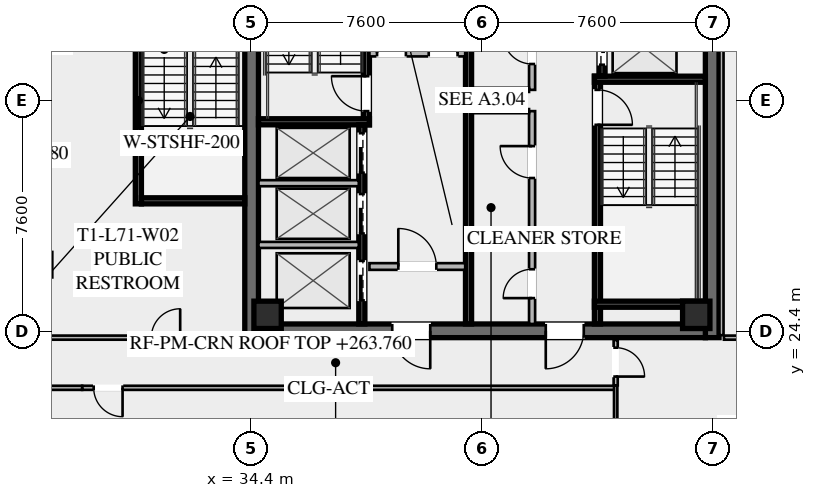
"""IFC4 building model, lengths in metres.
Left out: names, types, materials, properties, quantities, classifications, styles, units other than length and angle.
Written with IfcOpenShell. Run it as: python <this file> out.ifc"""

import sys

from ifc_helpers import new_model, si_unit, direction, frame, frame_2d, origin, origin_2d, place, context, subcontext, project, spatial, rectangle, hollow_rectangle, extrude, element, fill, save


model = new_model("IFC4")
c1 = context("Model", 3, precision=1e-05, world=origin(), true_north=direction((0.0, 1.0)))
c2 = subcontext(c1, "Body", "Model", "MODEL_VIEW")
j1 = project(units=[si_unit("LENGTHUNIT", "METRE"), si_unit("PLANEANGLEUNIT", "RADIAN")], contexts=[c1])
p1 = place(None, origin())
s1 = spatial("IfcSite", under=j1, at=p1, CompositionType="ELEMENT")
p2 = place(p1, origin())
s2 = spatial("IfcBuilding", under=s1, at=p2, CompositionType="ELEMENT")
p3 = place(p2, frame((0.0, 0.0, 263.4)))
s3 = spatial("IfcBuildingStorey", under=s2, at=p3, CompositionType="ELEMENT", Elevation=263.4)
for number, where, z_axis, x_axis in (
    (1, (34.425, 24.2, 0.0), (0.0, 0.0, 1.0), (0.0, 1.0, 0.0)),
    (2, (49.575, 39.8, 0.0), (0.0, 0.0, 1.0), (0.0, -1.0, 0.0)),
):
    element("IfcWall", number, at=place(p3, frame(where, z_axis=z_axis, x_axis=x_axis)), inside=s3, PredefinedType="SHEAR", context=c2, shape_type="SweptSolid", body=[
        extrude(rectangle(XDim=15.6, YDim=0.45, at=frame_2d((7.8, 0.0))), origin(), (0.0, 0.0, 1.0), 3.55),
    ])
p4 = place(p3, frame((49.35, 24.425, 0.0), z_axis=(0.0, 0.0, 1.0), x_axis=(-1.0, 0.0, 0.0)))
e3 = element("IfcWall", 3, at=p4, inside=s3, PredefinedType="SHEAR", context=c2, shape_type="SweptSolid", body=[
    extrude(rectangle(XDim=14.7, YDim=0.45, at=frame_2d((7.35, 0.0))), origin(), (0.0, 0.0, 1.0), 3.55),
])
p5 = place(p4, frame((9.05, 0.0, 0.0)))
e4 = element("IfcOpeningElement", 4, at=p5, cuts=e3, PredefinedType="OPENING", context=c2, shape_type="SweptSolid", body=[
    extrude(rectangle(XDim=1.25, YDim=2.25, at=frame_2d((0.625, 1.125))), frame((0.0, 0.235, 0.0), z_axis=(0.0, -1.0, 0.0), x_axis=(1.0, 0.0, 0.0)), (0.0, 0.0, 1.0), 0.47),
])
p6 = place(p4, frame((4.0, 0.0, 0.0)))
e5 = element("IfcOpeningElement", 5, at=p6, cuts=e3, PredefinedType="OPENING", context=c2, shape_type="SweptSolid", body=[
    extrude(rectangle(XDim=1.25, YDim=2.25, at=frame_2d((0.625, 1.125))), frame((0.0, 0.235, 0.0), z_axis=(0.0, -1.0, 0.0), x_axis=(1.0, 0.0, 0.0)), (0.0, 0.0, 1.0), 0.47),
])
for number, where, z_axis, x_axis in (
    (6, (34.95, 24.95, 0.0), (0.0, 0.0, 1.0), (1.0, 0.0, 0.0)),
    (7, (49.05, 24.95, 0.0), (0.0, 0.0, 1.0), (1.0, 0.0, 0.0)),
):
    element("IfcColumn", number, at=place(p3, frame(where, z_axis=z_axis, x_axis=x_axis)), inside=s3, PredefinedType="COLUMN", context=c2, shape_type="SweptSolid", body=[
        extrude(hollow_rectangle(XDim=0.9, YDim=0.9, WallThickness=0.04, at=origin_2d()), origin(), (0.0, 0.0, 1.0), 3.37),
    ])
p7 = place(p3, frame((38.2, 31.2, 0.0), z_axis=(0.0, 0.0, 1.0), x_axis=(0.0, 1.0, 0.0)))
e8 = element("IfcWall", 8, at=p7, inside=s3, PredefinedType="SHEAR", context=c2, shape_type="SweptSolid", body=[
    extrude(rectangle(XDim=8.15, YDim=0.2, at=frame_2d((4.075, 0.0))), origin(), (0.0, 0.0, 1.0), 3.37),
])
p8 = place(p7, frame((0.45, 0.0, 0.0)))
e9 = element("IfcOpeningElement", 9, at=p8, cuts=e8, PredefinedType="OPENING", context=c2, shape_type="SweptSolid", body=[
    extrude(rectangle(XDim=1.15, YDim=2.2, at=frame_2d((0.575, 1.1))), frame((0.0, 0.11, 0.0), z_axis=(0.0, -1.0, 0.0), x_axis=(1.0, 0.0, 0.0)), (0.0, 0.0, 1.0), 0.22),
])
p9 = place(p3, frame((34.65, 31.3, 0.0), z_axis=(0.0, 0.0, 1.0), x_axis=(1.0, 0.0, 0.0)))
e10 = element("IfcWall", 10, at=p9, inside=s3, PredefinedType="SHEAR", context=c2, shape_type="SweptSolid", body=[
    extrude(rectangle(XDim=3.65, YDim=0.2, at=frame_2d((1.825, 0.0))), origin(), (0.0, 0.0, 1.0), 3.37),
])
p10 = place(p3, frame((45.8, 32.8, 0.0), z_axis=(0.0, 0.0, 1.0), x_axis=(0.0, -1.0, 0.0)))
e11 = element("IfcWall", 11, at=p10, inside=s3, PredefinedType="SHEAR", context=c2, shape_type="SweptSolid", body=[
    extrude(rectangle(XDim=8.15, YDim=0.2, at=frame_2d((4.075, 0.0))), origin(), (0.0, 0.0, 1.0), 3.37),
])
p11 = place(p10, frame((0.45, 0.0, 0.0)))
e12 = element("IfcOpeningElement", 12, at=p11, cuts=e11, PredefinedType="OPENING", context=c2, shape_type="SweptSolid", body=[
    extrude(rectangle(XDim=1.15, YDim=2.2, at=frame_2d((0.575, 1.1))), frame((0.0, 0.11, 0.0), z_axis=(0.0, -1.0, 0.0), x_axis=(1.0, 0.0, 0.0)), (0.0, 0.0, 1.0), 0.22),
])
for number, where, z_axis, x_axis in (
    (13, (45.7, 32.7, 0.0), (0.0, 0.0, 1.0), (1.0, 0.0, 0.0)),
    (14, (45.7, 25.3, 0.0), (0.0, 0.0, 1.0), (1.0, 0.0, 0.0)),
):
    element("IfcWall", number, at=place(p3, frame(where, z_axis=z_axis, x_axis=x_axis)), inside=s3, PredefinedType="SHEAR", context=c2, shape_type="SweptSolid", body=[
        extrude(rectangle(XDim=3.65, YDim=0.2, at=frame_2d((1.825, 0.0))), origin(), (0.0, 0.0, 1.0), 3.37),
    ])
p12 = place(p3, frame((41.56, 24.65, 0.0), z_axis=(0.0, 0.0, 1.0), x_axis=(0.0, 1.0, 0.0)))
e15 = element("IfcWall", 15, at=p12, inside=s3, PredefinedType="SHEAR", context=c2, shape_type="SweptSolid", body=[
    extrude(rectangle(XDim=14.7, YDim=0.2, at=frame_2d((7.35, 0.0))), origin(), (0.0, 0.0, 1.0), 3.37),
])
p13 = place(p3, frame((38.3, 33.56, 0.0), z_axis=(0.0, 0.0, 1.0), x_axis=(1.0, 0.0, 0.0)))
e16 = element("IfcWall", 16, at=p13, inside=s3, PredefinedType="SOLIDWALL", context=c2, shape_type="SweptSolid", body=[
    extrude(rectangle(XDim=3.15, YDim=0.22, at=frame_2d((1.575, 0.0))), origin(), (0.0, 0.0, 1.0), 2.723),
])
p14 = place(p13, frame((0.25, 0.0, 0.0)))
e17 = element("IfcOpeningElement", 17, at=p14, cuts=e16, PredefinedType="OPENING", context=c2, shape_type="SweptSolid", body=[
    extrude(rectangle(XDim=0.95, YDim=2.05, at=frame_2d((0.475, 1.025))), frame((0.0, 0.12, 0.0), z_axis=(0.0, -1.0, 0.0), x_axis=(1.0, 0.0, 0.0)), (0.0, 0.0, 1.0), 0.24),
])
p15 = place(p13, frame((1.95, 0.0, 0.0)))
e18 = element("IfcOpeningElement", 18, at=p15, cuts=e16, PredefinedType="OPENING", context=c2, shape_type="SweptSolid", body=[
    extrude(rectangle(XDim=0.95, YDim=2.05, at=frame_2d((0.475, 1.025))), frame((0.0, 0.12, 0.0), z_axis=(0.0, -1.0, 0.0), x_axis=(1.0, 0.0, 0.0)), (0.0, 0.0, 1.0), 0.24),
])
p16 = place(p3, frame((38.3, 26.54, 0.0), z_axis=(0.0, 0.0, 1.0), x_axis=(1.0, 0.0, 0.0)))
e19 = element("IfcWall", 19, at=p16, inside=s3, PredefinedType="SOLIDWALL", context=c2, shape_type="SweptSolid", body=[
    extrude(rectangle(XDim=3.15, YDim=0.22, at=frame_2d((1.575, 0.0))), origin(), (0.0, 0.0, 1.0), 2.723),
])
p17 = place(p16, frame((0.95, 0.0, 0.0)))
e20 = element("IfcOpeningElement", 20, at=p17, cuts=e19, PredefinedType="OPENING", context=c2, shape_type="SweptSolid", body=[
    extrude(rectangle(XDim=1.25, YDim=2.25, at=frame_2d((0.625, 1.125))), frame((0.0, 0.12, 0.0), z_axis=(0.0, -1.0, 0.0), x_axis=(1.0, 0.0, 0.0)), (0.0, 0.0, 1.0), 0.24),
])
p18 = place(p3, frame((38.05, 24.65, 0.0), z_axis=(0.0, 0.0, 1.0), x_axis=(0.0, 1.0, 0.0)))
e21 = element("IfcWall", 21, at=p18, inside=s3, PredefinedType="SHEAR", context=c2, shape_type="SweptSolid", body=[
    extrude(rectangle(XDim=6.55, YDim=0.2, at=frame_2d((3.275, 0.0))), origin(), (0.0, 0.0, 1.0), 3.37),
])
p19 = place(p18, frame((4.975, 0.0, 0.0)))
e22 = element("IfcOpeningElement", 22, at=p19, cuts=e21, PredefinedType="OPENING", context=c2, shape_type="SweptSolid", body=[
    extrude(rectangle(XDim=1.3, YDim=2.25, at=frame_2d((0.65, 1.125))), frame((0.0, 0.11, 0.0), z_axis=(0.0, -1.0, 0.0), x_axis=(1.0, 0.0, 0.0)), (0.0, 0.0, 1.0), 0.22),
])
p20 = place(p18, frame((2.975, 0.0, 0.0)))
e23 = element("IfcOpeningElement", 23, at=p20, cuts=e21, PredefinedType="OPENING", context=c2, shape_type="SweptSolid", body=[
    extrude(rectangle(XDim=1.3, YDim=2.25, at=frame_2d((0.65, 1.125))), frame((0.0, 0.11, 0.0), z_axis=(0.0, -1.0, 0.0), x_axis=(1.0, 0.0, 0.0)), (0.0, 0.0, 1.0), 0.22),
])
p21 = place(p18, frame((0.775, 0.0, 0.0)))
e24 = element("IfcOpeningElement", 24, at=p21, cuts=e21, PredefinedType="OPENING", context=c2, shape_type="SweptSolid", body=[
    extrude(rectangle(XDim=1.3, YDim=2.25, at=frame_2d((0.65, 1.125))), frame((0.0, 0.11, 0.0), z_axis=(0.0, -1.0, 0.0), x_axis=(1.0, 0.0, 0.0)), (0.0, 0.0, 1.0), 0.22),
])
for number, where, z_axis, x_axis in (
    (25, (34.65, 27.25, 0.0), (0.0, 0.0, 1.0), (1.0, 0.0, 0.0)),
    (26, (34.65, 29.28, 0.0), (0.0, 0.0, 1.0), (1.0, 0.0, 0.0)),
):
    element("IfcWall", number, at=place(p3, frame(where, z_axis=z_axis, x_axis=x_axis)), inside=s3, PredefinedType="SOLIDWALL", context=c2, shape_type="SweptSolid", body=[
        extrude(rectangle(XDim=3.3, YDim=0.2, at=frame_2d((1.65, 0.0))), origin(), (0.0, 0.0, 1.0), 3.37),
    ])
p22 = place(p3, frame((45.95, 39.35, 0.0), z_axis=(0.0, 0.0, 1.0), x_axis=(0.0, -1.0, 0.0)))
e27 = element("IfcWall", 27, at=p22, inside=s3, PredefinedType="SHEAR", context=c2, shape_type="SweptSolid", body=[
    extrude(rectangle(XDim=6.55, YDim=0.2, at=frame_2d((3.275, 0.0))), origin(), (0.0, 0.0, 1.0), 3.37),
])
p23 = place(p22, frame((5.075, 0.0, 0.0)))
e28 = element("IfcOpeningElement", 28, at=p23, cuts=e27, PredefinedType="OPENING", context=c2, shape_type="SweptSolid", body=[
    extrude(rectangle(XDim=1.1, YDim=2.2, at=frame_2d((0.55, 1.1))), frame((0.0, 0.11, 0.0), z_axis=(0.0, -1.0, 0.0), x_axis=(1.0, 0.0, 0.0)), (0.0, 0.0, 1.0), 0.22),
])
p24 = place(p22, frame((3.025, 0.0, 0.0)))
e29 = element("IfcOpeningElement", 29, at=p24, cuts=e27, PredefinedType="OPENING", context=c2, shape_type="SweptSolid", body=[
    extrude(rectangle(XDim=1.1, YDim=2.2, at=frame_2d((0.55, 1.1))), frame((0.0, 0.11, 0.0), z_axis=(0.0, -1.0, 0.0), x_axis=(1.0, 0.0, 0.0)), (0.0, 0.0, 1.0), 0.22),
])
p25 = place(p22, frame((1.025, 0.0, 0.0)))
e30 = element("IfcOpeningElement", 30, at=p25, cuts=e27, PredefinedType="OPENING", context=c2, shape_type="SweptSolid", body=[
    extrude(rectangle(XDim=1.1, YDim=2.2, at=frame_2d((0.55, 1.1))), frame((0.0, 0.11, 0.0), z_axis=(0.0, -1.0, 0.0), x_axis=(1.0, 0.0, 0.0)), (0.0, 0.0, 1.0), 0.22),
])
p26 = place(p3, frame((43.65, 24.65, 0.0), z_axis=(0.0, 0.0, 1.0), x_axis=(0.0, 1.0, 0.0)))
e31 = element("IfcWall", 31, at=p26, inside=s3, PredefinedType="SOLIDWALL", context=c2, shape_type="SweptSolid", body=[
    extrude(rectangle(XDim=7.0, YDim=0.2, at=frame_2d((3.5, 0.0))), origin(), (0.0, 0.0, 1.0), 2.723),
])
p27 = place(p26, frame((0.85, 0.0, 0.0)))
e32 = element("IfcOpeningElement", 32, at=p27, cuts=e31, PredefinedType="OPENING", context=c2, shape_type="SweptSolid", body=[
    extrude(rectangle(XDim=0.95, YDim=2.05, at=frame_2d((0.475, 1.025))), frame((0.0, 0.11, 0.0), z_axis=(0.0, -1.0, 0.0), x_axis=(1.0, 0.0, 0.0)), (0.0, 0.0, 1.0), 0.22),
])
p28 = place(p26, frame((4.8, 0.0, 0.0)))
e33 = element("IfcOpeningElement", 33, at=p28, cuts=e31, PredefinedType="OPENING", context=c2, shape_type="SweptSolid", body=[
    extrude(rectangle(XDim=1.05, YDim=2.2, at=frame_2d((0.525, 1.1))), frame((0.0, 0.11, 0.0), z_axis=(0.0, -1.0, 0.0), x_axis=(1.0, 0.0, 0.0)), (0.0, 0.0, 1.0), 0.22),
])
for number, where, z_axis, x_axis in (
    (34, (41.67, 31.65, 0.0), (0.0, 0.0, 1.0), (1.0, 0.0, 0.0)),
    (35, (41.67, 27.6, 0.0), (0.0, 0.0, 1.0), (1.0, 0.0, 0.0)),
):
    element("IfcWall", number, at=place(p3, frame(where, z_axis=z_axis, x_axis=x_axis)), inside=s3, PredefinedType="PARTITIONING", context=c2, shape_type="SweptSolid", body=[
        extrude(rectangle(XDim=1.88, YDim=0.135, at=frame_2d((0.94, 0.0))), origin(), (0.0, 0.0, 1.0), 2.723),
    ])
p29 = place(p3, frame((43.65, 32.35, 0.0), z_axis=(0.0, 0.0, 1.0), x_axis=(0.0, 1.0, 0.0)))
e36 = element("IfcWall", 36, at=p29, inside=s3, PredefinedType="SOLIDWALL", context=c2, shape_type="SweptSolid", body=[
    extrude(rectangle(XDim=7.0, YDim=0.2, at=frame_2d((3.5, 0.0))), origin(), (0.0, 0.0, 1.0), 2.723),
])
p30 = place(p29, frame((0.85, 0.0, 0.0)))
e37 = element("IfcOpeningElement", 37, at=p30, cuts=e36, PredefinedType="OPENING", context=c2, shape_type="SweptSolid", body=[
    extrude(rectangle(XDim=0.95, YDim=2.05, at=frame_2d((0.475, 1.025))), frame((0.0, 0.11, 0.0), z_axis=(0.0, -1.0, 0.0), x_axis=(1.0, 0.0, 0.0)), (0.0, 0.0, 1.0), 0.22),
])
p31 = place(p29, frame((4.85, 0.0, 0.0)))
e38 = element("IfcOpeningElement", 38, at=p31, cuts=e36, PredefinedType="OPENING", context=c2, shape_type="SweptSolid", body=[
    extrude(rectangle(XDim=0.95, YDim=2.05, at=frame_2d((0.475, 1.025))), frame((0.0, 0.11, 0.0), z_axis=(0.0, -1.0, 0.0), x_axis=(1.0, 0.0, 0.0)), (0.0, 0.0, 1.0), 0.22),
])
p32 = place(p3, frame((41.67, 32.35, 0.0), z_axis=(0.0, 0.0, 1.0), x_axis=(1.0, 0.0, 0.0)))
e39 = element("IfcWall", 39, at=p32, inside=s3, PredefinedType="PARTITIONING", context=c2, shape_type="SweptSolid", body=[
    extrude(rectangle(XDim=1.88, YDim=0.135, at=frame_2d((0.94, 0.0))), origin(), (0.0, 0.0, 1.0), 2.723),
])
p33 = place(p3, frame((30.7, 28.6, 0.0), z_axis=(0.0, 0.0, 1.0), x_axis=(0.0, 1.0, 0.0)))
e40 = element("IfcWall", 40, at=p33, inside=s3, PredefinedType="SHEAR", context=c2, shape_type="SweptSolid", body=[
    extrude(rectangle(XDim=6.8, YDim=0.2, at=frame_2d((3.4, 0.0))), origin(), (0.0, 0.0, 1.0), 3.37),
])
p34 = place(p3, frame((30.8, 28.7, 0.0), z_axis=(0.0, 0.0, 1.0), x_axis=(1.0, 0.0, 0.0)))
e41 = element("IfcWall", 41, at=p34, inside=s3, PredefinedType="SHEAR", context=c2, shape_type="SweptSolid", body=[
    extrude(rectangle(XDim=3.4, YDim=0.2, at=frame_2d((1.7, 0.0))), origin(), (0.0, 0.0, 1.0), 3.37),
])
p35 = place(p3, frame((46.4, 22.55, 0.0), z_axis=(0.0, 0.0, 1.0), x_axis=(-1.0, 0.0, 0.0)))
e42 = element("IfcWall", 42, at=p35, inside=s3, PredefinedType="PARTITIONING", context=c2, shape_type="SweptSolid", body=[
    extrude(rectangle(XDim=17.55, YDim=0.135, at=frame_2d((8.775, 0.0))), origin(), (0.0, 0.0, 1.0), 2.723),
])
p36 = place(p35, frame((16.22, 0.0, 0.0)))
e43 = element("IfcOpeningElement", 43, at=p36, cuts=e42, PredefinedType="OPENING", context=c2, shape_type="SweptSolid", body=[
    extrude(rectangle(XDim=0.95, YDim=2.05, at=frame_2d((0.475, 1.025))), frame((0.0, 0.077, 0.0), z_axis=(0.0, -1.0, 0.0), x_axis=(1.0, 0.0, 0.0)), (0.0, 0.0, 1.0), 0.155),
])
p37 = place(p3, frame((26.82, 22.55, 0.0), z_axis=(0.0, 0.0, 1.0), x_axis=(1.0, 0.0, 0.0)))
e44 = element("IfcWall", 44, at=p37, inside=s3, PredefinedType="PARTITIONING", context=c2, shape_type="SweptSolid", body=[
    extrude(rectangle(XDim=2.03, YDim=0.135, at=frame_2d((1.015, 0.0))), origin(), (0.0, 0.0, 1.0), 2.723),
])
p38 = place(p3, frame((46.4, 24.12, 0.0), z_axis=(0.0, 0.0, 1.0), x_axis=(0.0, -1.0, 0.0)))
e45 = element("IfcWall", 45, at=p38, inside=s3, PredefinedType="PARTITIONING", context=c2, shape_type="SweptSolid", body=[
    extrude(rectangle(XDim=1.49, YDim=0.135, at=frame_2d((0.745, 0.0))), origin(), (0.0, 0.0, 1.0), 2.723),
])
p39 = place(p38, frame((0.25, 0.0, 0.0)))
e46 = element("IfcOpeningElement", 46, at=p39, cuts=e45, PredefinedType="OPENING", context=c2, shape_type="SweptSolid", body=[
    extrude(rectangle(XDim=0.95, YDim=2.05, at=frame_2d((0.475, 1.025))), frame((0.0, 0.077, 0.0), z_axis=(0.0, -1.0, 0.0), x_axis=(1.0, 0.0, 0.0)), (0.0, 0.0, 1.0), 0.155),
])
p40 = place(p3, frame((46.4, 16.82, 0.0), z_axis=(0.0, 0.0, 1.0), x_axis=(0.0, 1.0, 0.0)))
e47 = element("IfcWall", 47, at=p40, inside=s3, PredefinedType="PARTITIONING", context=c2, shape_type="SweptSolid", body=[
    extrude(rectangle(XDim=5.81, YDim=0.11, at=frame_2d((2.905, 0.0))), origin(), (0.0, 0.0, 1.0), 2.723),
])
p41 = place(p3, frame((49.88, 39.72, 0.0), z_axis=(0.0, 0.0, 1.0), x_axis=(0.0, -1.0, 0.0)))
e48 = element("IfcWall", 48, at=p41, inside=s3, PredefinedType="PARTITIONING", context=c2, shape_type="SweptSolid", body=[
    extrude(rectangle(XDim=15.44, YDim=0.135, at=frame_2d((7.72, 0.0))), origin(), (0.0, 0.0, 1.0), 2.723),
])
p42 = place(p3, frame((49.96, 24.2, 0.0), z_axis=(0.0, 0.0, 1.0), x_axis=(1.0, 0.0, 0.0)))
e49 = element("IfcWall", 49, at=p42, inside=s3, PredefinedType="PARTITIONING", context=c2, shape_type="SweptSolid", body=[
    extrude(rectangle(XDim=7.07, YDim=0.135, at=frame_2d((3.535, 0.0))), origin(), (0.0, 0.0, 1.0), 2.723),
])
p43 = place(p3, frame((26.97, 24.2, 0.0), z_axis=(0.0, 0.0, 1.0), x_axis=(1.0, 0.0, 0.0)))
e50 = element("IfcWall", 50, at=p43, inside=s3, PredefinedType="PARTITIONING", context=c2, shape_type="SweptSolid", body=[
    extrude(rectangle(XDim=7.15, YDim=0.135, at=frame_2d((3.575, 0.0))), origin(), (0.0, 0.0, 1.0), 2.723),
])
p44 = place(p43, frame((4.155, 0.0, 0.0)))
e51 = element("IfcOpeningElement", 51, at=p44, cuts=e50, PredefinedType="OPENING", context=c2, shape_type="SweptSolid", body=[
    extrude(rectangle(XDim=0.95, YDim=2.05, at=frame_2d((0.475, 1.025))), frame((0.0, 0.077, 0.0), z_axis=(0.0, -1.0, 0.0), x_axis=(1.0, 0.0, 0.0)), (0.0, 0.0, 1.0), 0.155),
])
p45 = place(p5, origin())
e52 = element("IfcDoor", 52, at=p45, inside=s3, OperationType="SINGLE_SWING_LEFT", PredefinedType="DOOR", context=c2, shape_type="SweptSolid", body=[
    extrude(rectangle(XDim=1.25, YDim=2.25, at=frame_2d((0.625, 1.125))), frame((0.0, 0.025, 0.0), z_axis=(0.0, -1.0, 0.0), x_axis=(1.0, 0.0, 0.0)), (0.0, 0.0, 1.0), 0.05),
])
fill(e4, e52)
p46 = place(p6, origin())
e53 = element("IfcDoor", 53, at=p46, inside=s3, OperationType="SINGLE_SWING_RIGHT", PredefinedType="DOOR", context=c2, shape_type="SweptSolid", body=[
    extrude(rectangle(XDim=1.25, YDim=2.25, at=frame_2d((0.625, 1.125))), frame((0.0, 0.025, 0.0), z_axis=(0.0, -1.0, 0.0), x_axis=(1.0, 0.0, 0.0)), (0.0, 0.0, 1.0), 0.05),
])
fill(e5, e53)
p47 = place(p8, origin())
e54 = element("IfcDoor", 54, at=p47, inside=s3, OperationType="SINGLE_SWING_RIGHT", PredefinedType="DOOR", context=c2, shape_type="SweptSolid", body=[
    extrude(rectangle(XDim=1.15, YDim=2.2, at=frame_2d((0.575, 1.1))), frame((0.0, 0.025, 0.0), z_axis=(0.0, -1.0, 0.0), x_axis=(1.0, 0.0, 0.0)), (0.0, 0.0, 1.0), 0.05),
])
fill(e9, e54)
p48 = place(p11, origin())
e55 = element("IfcDoor", 55, at=p48, inside=s3, OperationType="SINGLE_SWING_RIGHT", PredefinedType="DOOR", context=c2, shape_type="SweptSolid", body=[
    extrude(rectangle(XDim=1.15, YDim=2.2, at=frame_2d((0.575, 1.1))), frame((0.0, 0.025, 0.0), z_axis=(0.0, -1.0, 0.0), x_axis=(1.0, 0.0, 0.0)), (0.0, 0.0, 1.0), 0.05),
])
fill(e12, e55)
p49 = place(p17, origin())
e56 = element("IfcDoor", 56, at=p49, inside=s3, OperationType="SINGLE_SWING_LEFT", PredefinedType="DOOR", context=c2, shape_type="SweptSolid", body=[
    extrude(rectangle(XDim=1.25, YDim=2.25, at=frame_2d((0.625, 1.125))), frame((0.0, 0.025, 0.0), z_axis=(0.0, -1.0, 0.0), x_axis=(1.0, 0.0, 0.0)), (0.0, 0.0, 1.0), 0.05),
])
fill(e20, e56)
p50 = place(p14, origin())
e57 = element("IfcDoor", 57, at=p50, inside=s3, OperationType="SINGLE_SWING_LEFT", PredefinedType="DOOR", context=c2, shape_type="SweptSolid", body=[
    extrude(rectangle(XDim=0.95, YDim=2.05, at=frame_2d((0.475, 1.025))), frame((0.0, 0.025, 0.0), z_axis=(0.0, -1.0, 0.0), x_axis=(1.0, 0.0, 0.0)), (0.0, 0.0, 1.0), 0.05),
])
fill(e17, e57)
p51 = place(p15, origin())
e58 = element("IfcDoor", 58, at=p51, inside=s3, OperationType="SINGLE_SWING_RIGHT", PredefinedType="DOOR", context=c2, shape_type="SweptSolid", body=[
    extrude(rectangle(XDim=0.95, YDim=2.05, at=frame_2d((0.475, 1.025))), frame((0.0, 0.025, 0.0), z_axis=(0.0, -1.0, 0.0), x_axis=(1.0, 0.0, 0.0)), (0.0, 0.0, 1.0), 0.05),
])
fill(e18, e58)
p52 = place(p27, origin())
e59 = element("IfcDoor", 59, at=p52, inside=s3, OperationType="SINGLE_SWING_LEFT", PredefinedType="DOOR", context=c2, shape_type="SweptSolid", body=[
    extrude(rectangle(XDim=0.95, YDim=2.05, at=frame_2d((0.475, 1.025))), frame((0.0, 0.025, 0.0), z_axis=(0.0, -1.0, 0.0), x_axis=(1.0, 0.0, 0.0)), (0.0, 0.0, 1.0), 0.05),
])
fill(e32, e59)
p53 = place(p28, origin())
e60 = element("IfcDoor", 60, at=p53, inside=s3, OperationType="SINGLE_SWING_RIGHT", PredefinedType="DOOR", context=c2, shape_type="SweptSolid", body=[
    extrude(rectangle(XDim=1.05, YDim=2.2, at=frame_2d((0.525, 1.1))), frame((0.0, 0.025, 0.0), z_axis=(0.0, -1.0, 0.0), x_axis=(1.0, 0.0, 0.0)), (0.0, 0.0, 1.0), 0.05),
])
fill(e33, e60)
p54 = place(p30, origin())
e61 = element("IfcDoor", 61, at=p54, inside=s3, OperationType="SINGLE_SWING_RIGHT", PredefinedType="DOOR", context=c2, shape_type="SweptSolid", body=[
    extrude(rectangle(XDim=0.95, YDim=2.05, at=frame_2d((0.475, 1.025))), frame((0.0, 0.025, 0.0), z_axis=(0.0, -1.0, 0.0), x_axis=(1.0, 0.0, 0.0)), (0.0, 0.0, 1.0), 0.05),
])
fill(e37, e61)
p55 = place(p36, origin())
e62 = element("IfcDoor", 62, at=p55, inside=s3, OperationType="SINGLE_SWING_LEFT", PredefinedType="DOOR", context=c2, shape_type="SweptSolid", body=[
    extrude(rectangle(XDim=0.95, YDim=2.05, at=frame_2d((0.475, 1.025))), frame((0.0, 0.025, 0.0), z_axis=(0.0, -1.0, 0.0), x_axis=(1.0, 0.0, 0.0)), (0.0, 0.0, 1.0), 0.05),
])
fill(e43, e62)
p56 = place(p39, origin())
e63 = element("IfcDoor", 63, at=p56, inside=s3, OperationType="SINGLE_SWING_RIGHT", PredefinedType="DOOR", context=c2, shape_type="SweptSolid", body=[
    extrude(rectangle(XDim=0.95, YDim=2.05, at=frame_2d((0.475, 1.025))), frame((0.0, 0.025, 0.0), z_axis=(0.0, -1.0, 0.0), x_axis=(1.0, 0.0, 0.0)), (0.0, 0.0, 1.0), 0.05),
])
fill(e46, e63)
p57 = place(p44, origin())
e64 = element("IfcDoor", 64, at=p57, inside=s3, OperationType="SINGLE_SWING_RIGHT", PredefinedType="DOOR", context=c2, shape_type="SweptSolid", body=[
    extrude(rectangle(XDim=0.95, YDim=2.05, at=frame_2d((0.475, 1.025))), frame((0.0, 0.025, 0.0), z_axis=(0.0, -1.0, 0.0), x_axis=(1.0, 0.0, 0.0)), (0.0, 0.0, 1.0), 0.05),
])
fill(e51, e64)
p58 = place(p19, origin())
e65 = element("IfcDoor", 65, at=p58, inside=s3, OperationType="SLIDING_TO_LEFT", PredefinedType="DOOR", context=c2, shape_type="SweptSolid", body=[
    extrude(rectangle(XDim=1.3, YDim=2.25, at=frame_2d((0.65, 1.125))), frame((0.0, 0.025, 0.0), z_axis=(0.0, -1.0, 0.0), x_axis=(1.0, 0.0, 0.0)), (0.0, 0.0, 1.0), 0.05),
])
fill(e22, e65)
p59 = place(p20, origin())
e66 = element("IfcDoor", 66, at=p59, inside=s3, OperationType="SLIDING_TO_LEFT", PredefinedType="DOOR", context=c2, shape_type="SweptSolid", body=[
    extrude(rectangle(XDim=1.3, YDim=2.25, at=frame_2d((0.65, 1.125))), frame((0.0, 0.025, 0.0), z_axis=(0.0, -1.0, 0.0), x_axis=(1.0, 0.0, 0.0)), (0.0, 0.0, 1.0), 0.05),
])
fill(e23, e66)
p60 = place(p21, origin())
e67 = element("IfcDoor", 67, at=p60, inside=s3, OperationType="SLIDING_TO_LEFT", PredefinedType="DOOR", context=c2, shape_type="SweptSolid", body=[
    extrude(rectangle(XDim=1.3, YDim=2.25, at=frame_2d((0.65, 1.125))), frame((0.0, 0.025, 0.0), z_axis=(0.0, -1.0, 0.0), x_axis=(1.0, 0.0, 0.0)), (0.0, 0.0, 1.0), 0.05),
])
fill(e24, e67)
p61 = place(p23, origin())
e68 = element("IfcDoor", 68, at=p61, inside=s3, OperationType="SLIDING_TO_LEFT", PredefinedType="DOOR", context=c2, shape_type="SweptSolid", body=[
    extrude(rectangle(XDim=1.1, YDim=2.2, at=frame_2d((0.55, 1.1))), frame((0.0, 0.025, 0.0), z_axis=(0.0, -1.0, 0.0), x_axis=(1.0, 0.0, 0.0)), (0.0, 0.0, 1.0), 0.05),
])
fill(e28, e68)
save(model, sys.argv[1])
